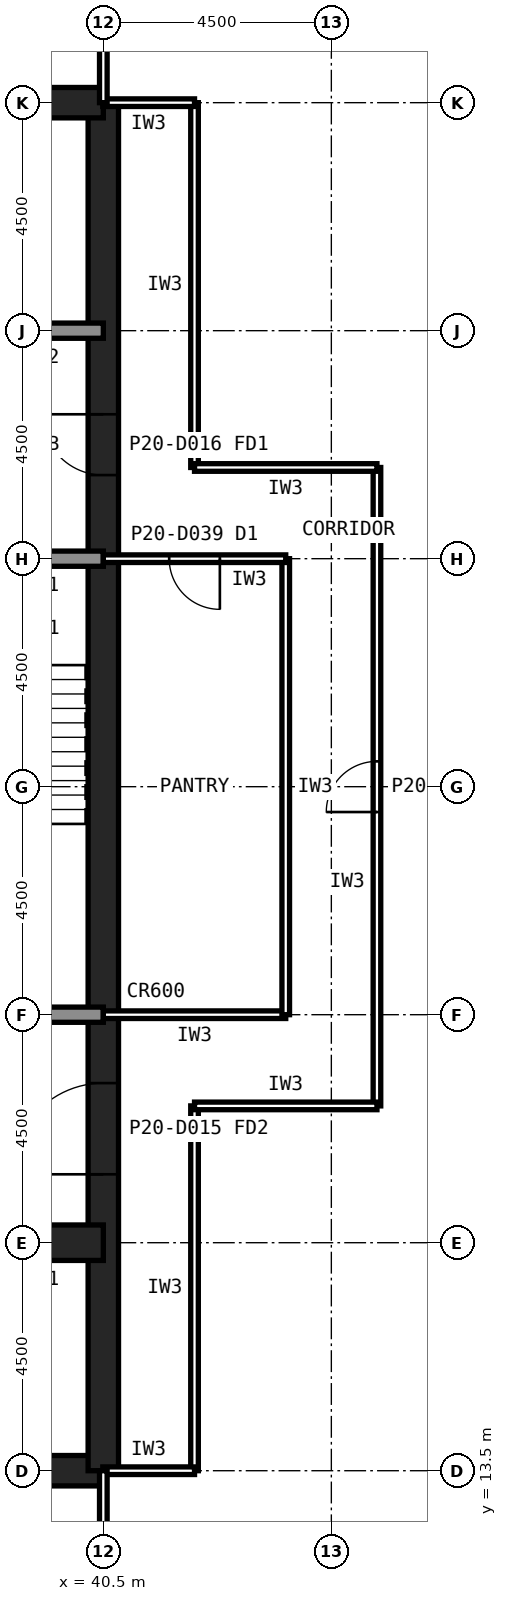
"""IFC4 building model, lengths in metres.
Left out: names, types, materials, properties, quantities, classifications, styles, units other than length and angle.
Written with IfcOpenShell. Run it as: python <this file> out.ifc"""

import sys

from ifc_helpers import new_model, si_unit, direction, frame, frame_2d, origin, place, context, subcontext, project, spatial, rectangle, extrude, element, fill, save


model = new_model("IFC4")
c1 = context("Model", 3, precision=1e-05, world=origin(), true_north=direction((0.0, 1.0)))
c2 = subcontext(c1, "Body", "Model", "MODEL_VIEW")
j1 = project(units=[si_unit("LENGTHUNIT", "METRE"), si_unit("PLANEANGLEUNIT", "RADIAN")], contexts=[c1])
p1 = place(None, origin())
s1 = spatial("IfcSite", under=j1, at=p1, CompositionType="ELEMENT")
p2 = place(p1, origin())
s2 = spatial("IfcBuilding", under=s1, at=p2, CompositionType="ELEMENT")
p3 = place(p2, frame((0.0, 0.0, 87.8)))
s3 = spatial("IfcBuildingStorey", under=s2, at=p3, CompositionType="ELEMENT", Elevation=87.8)
p4 = place(p3, frame((13.5, 13.5, 0.0), z_axis=(0.0, 0.0, 1.0), x_axis=(1.0, 0.0, 0.0)))
e1 = element("IfcWall", 1, at=p4, inside=s3, PredefinedType="SHEAR", context=c2, shape_type="SweptSolid", body=[
    extrude(rectangle(XDim=27.0, YDim=0.6, at=frame_2d((13.5, 0.0))), origin(), (0.0, 0.0, 1.0), 4.2),
])
p5 = place(p3, frame((40.5, 13.5, 0.0), z_axis=(0.0, 0.0, 1.0), x_axis=(0.0, 1.0, 0.0)))
e2 = element("IfcWall", 2, at=p5, inside=s3, PredefinedType="SHEAR", context=c2, shape_type="SweptSolid", body=[
    extrude(rectangle(XDim=27.0, YDim=0.6, at=frame_2d((13.5, 0.0))), origin(), (0.0, 0.0, 1.0), 4.2),
])
p6 = place(p5, frame((5.85, 0.0, 0.0)))
e3 = element("IfcOpeningElement", 3, at=p6, cuts=e2, PredefinedType="OPENING", context=c2, shape_type="SweptSolid", body=[
    extrude(rectangle(XDim=1.8, YDim=2.1, at=frame_2d((0.9, 1.05))), frame((0.0, 0.31, 0.0), z_axis=(0.0, -1.0, 0.0), x_axis=(1.0, 0.0, 0.0)), (0.0, 0.0, 1.0), 0.62),
])
p7 = place(p5, frame((19.65, 0.0, 0.0)))
e4 = element("IfcOpeningElement", 4, at=p7, cuts=e2, PredefinedType="OPENING", context=c2, shape_type="SweptSolid", body=[
    extrude(rectangle(XDim=1.2, YDim=2.1, at=frame_2d((0.6, 1.05))), frame((0.0, 0.31, 0.0), z_axis=(0.0, -1.0, 0.0), x_axis=(1.0, 0.0, 0.0)), (0.0, 0.0, 1.0), 0.62),
])
p8 = place(p3, frame((40.5, 40.5, 0.0), z_axis=(0.0, 0.0, 1.0), x_axis=(-1.0, 0.0, 0.0)))
e5 = element("IfcWall", 5, at=p8, inside=s3, PredefinedType="SHEAR", context=c2, shape_type="SweptSolid", body=[
    extrude(rectangle(XDim=27.0, YDim=0.6, at=frame_2d((13.5, 0.0))), origin(), (0.0, 0.0, 1.0), 4.2),
])
p9 = place(p3, frame((13.5, 18.0, 0.0), z_axis=(0.0, 0.0, 1.0), x_axis=(1.0, 0.0, 0.0)))
e6 = element("IfcWall", 6, at=p9, inside=s3, PredefinedType="SHEAR", context=c2, shape_type="SweptSolid", body=[
    extrude(rectangle(XDim=27.0, YDim=0.7, at=frame_2d((13.5, 0.0))), origin(), (0.0, 0.0, 1.0), 4.2),
])
p10 = place(p9, frame((24.3, 0.0, 0.0)))
e7 = element("IfcOpeningElement", 7, at=p10, cuts=e6, PredefinedType="OPENING", context=c2, shape_type="SweptSolid", body=[
    extrude(rectangle(XDim=0.9, YDim=2.1, at=frame_2d((0.45, 1.05))), frame((0.0, 0.36, 0.0), z_axis=(0.0, -1.0, 0.0), x_axis=(1.0, 0.0, 0.0)), (0.0, 0.0, 1.0), 0.72),
])
p11 = place(p9, frame((5.45, 0.0, 0.0)))
e8 = element("IfcOpeningElement", 8, at=p11, cuts=e6, PredefinedType="OPENING", context=c2, shape_type="SweptSolid", body=[
    extrude(rectangle(XDim=1.1, YDim=2.1, at=frame_2d((0.55, 1.05))), frame((0.0, 0.36, 0.0), z_axis=(0.0, -1.0, 0.0), x_axis=(1.0, 0.0, 0.0)), (0.0, 0.0, 1.0), 0.72),
])
p12 = place(p9, frame((8.45, 0.0, 0.0)))
e9 = element("IfcOpeningElement", 9, at=p12, cuts=e6, PredefinedType="OPENING", context=c2, shape_type="SweptSolid", body=[
    extrude(rectangle(XDim=1.1, YDim=2.1, at=frame_2d((0.55, 1.05))), frame((0.0, 0.36, 0.0), z_axis=(0.0, -1.0, 0.0), x_axis=(1.0, 0.0, 0.0)), (0.0, 0.0, 1.0), 0.72),
])
p13 = place(p9, frame((11.45, 0.0, 0.0)))
e10 = element("IfcOpeningElement", 10, at=p13, cuts=e6, PredefinedType="OPENING", context=c2, shape_type="SweptSolid", body=[
    extrude(rectangle(XDim=1.1, YDim=2.1, at=frame_2d((0.55, 1.05))), frame((0.0, 0.36, 0.0), z_axis=(0.0, -1.0, 0.0), x_axis=(1.0, 0.0, 0.0)), (0.0, 0.0, 1.0), 0.72),
])
p14 = place(p9, frame((14.45, 0.0, 0.0)))
e11 = element("IfcOpeningElement", 11, at=p14, cuts=e6, PredefinedType="OPENING", context=c2, shape_type="SweptSolid", body=[
    extrude(rectangle(XDim=1.1, YDim=2.1, at=frame_2d((0.55, 1.05))), frame((0.0, 0.36, 0.0), z_axis=(0.0, -1.0, 0.0), x_axis=(1.0, 0.0, 0.0)), (0.0, 0.0, 1.0), 0.72),
])
p15 = place(p9, frame((17.45, 0.0, 0.0)))
e12 = element("IfcOpeningElement", 12, at=p15, cuts=e6, PredefinedType="OPENING", context=c2, shape_type="SweptSolid", body=[
    extrude(rectangle(XDim=1.1, YDim=2.1, at=frame_2d((0.55, 1.05))), frame((0.0, 0.36, 0.0), z_axis=(0.0, -1.0, 0.0), x_axis=(1.0, 0.0, 0.0)), (0.0, 0.0, 1.0), 0.72),
])
p16 = place(p9, frame((20.45, 0.0, 0.0)))
e13 = element("IfcOpeningElement", 13, at=p16, cuts=e6, PredefinedType="OPENING", context=c2, shape_type="SweptSolid", body=[
    extrude(rectangle(XDim=1.1, YDim=2.1, at=frame_2d((0.55, 1.05))), frame((0.0, 0.36, 0.0), z_axis=(0.0, -1.0, 0.0), x_axis=(1.0, 0.0, 0.0)), (0.0, 0.0, 1.0), 0.72),
])
p17 = place(p9, frame((1.6, 0.0, 0.0)))
e14 = element("IfcOpeningElement", 14, at=p17, cuts=e6, PredefinedType="OPENING", context=c2, shape_type="SweptSolid", body=[
    extrude(rectangle(XDim=1.3, YDim=2.2, at=frame_2d((0.65, 1.1))), frame((0.0, 0.36, 0.0), z_axis=(0.0, -1.0, 0.0), x_axis=(1.0, 0.0, 0.0)), (0.0, 0.0, 1.0), 0.72),
])
p18 = place(p3, frame((13.5, 36.0, 0.0), z_axis=(0.0, 0.0, 1.0), x_axis=(1.0, 0.0, 0.0)))
e15 = element("IfcWall", 15, at=p18, inside=s3, PredefinedType="SOLIDWALL", context=c2, shape_type="SweptSolid", body=[
    extrude(rectangle(XDim=27.0, YDim=0.3, at=frame_2d((13.5, 0.0))), origin(), (0.0, 0.0, 1.0), 4.04),
])
p19 = place(p18, frame((1.8, 0.0, 0.0)))
e16 = element("IfcOpeningElement", 16, at=p19, cuts=e15, PredefinedType="OPENING", context=c2, shape_type="SweptSolid", body=[
    extrude(rectangle(XDim=0.9, YDim=2.1, at=frame_2d((0.45, 1.05))), frame((0.0, 0.16, 0.0), z_axis=(0.0, -1.0, 0.0), x_axis=(1.0, 0.0, 0.0)), (0.0, 0.0, 1.0), 0.32),
])
p20 = place(p18, frame((24.1, 0.0, 0.0)))
e17 = element("IfcOpeningElement", 17, at=p20, cuts=e15, PredefinedType="OPENING", context=c2, shape_type="SweptSolid", body=[
    extrude(rectangle(XDim=1.3, YDim=2.2, at=frame_2d((0.65, 1.1))), frame((0.0, 0.16, 0.0), z_axis=(0.0, -1.0, 0.0), x_axis=(1.0, 0.0, 0.0)), (0.0, 0.0, 1.0), 0.32),
])
p21 = place(p3, frame((13.5, 22.5, 0.0), z_axis=(0.0, 0.0, 1.0), x_axis=(1.0, 0.0, 0.0)))
e18 = element("IfcWall", 18, at=p21, inside=s3, PredefinedType="SOLIDWALL", context=c2, shape_type="SweptSolid", body=[
    extrude(rectangle(XDim=27.0, YDim=0.3, at=frame_2d((13.5, 0.0))), origin(), (0.0, 0.0, 1.0), 4.04),
])
p22 = place(p21, frame((1.65, 0.0, 0.0)))
e19 = element("IfcOpeningElement", 19, at=p22, cuts=e18, PredefinedType="OPENING", context=c2, shape_type="SweptSolid", body=[
    extrude(rectangle(XDim=1.2, YDim=2.1, at=frame_2d((0.6, 1.05))), frame((0.0, 0.16, 0.0), z_axis=(0.0, -1.0, 0.0), x_axis=(1.0, 0.0, 0.0)), (0.0, 0.0, 1.0), 0.32),
])
p23 = place(p21, frame((6.025, 0.0, 0.0)))
e20 = element("IfcOpeningElement", 20, at=p23, cuts=e18, PredefinedType="OPENING", context=c2, shape_type="SweptSolid", body=[
    extrude(rectangle(XDim=1.0, YDim=2.1, at=frame_2d((0.5, 1.05))), frame((0.0, 0.16, 0.0), z_axis=(0.0, -1.0, 0.0), x_axis=(1.0, 0.0, 0.0)), (0.0, 0.0, 1.0), 0.32),
])
p24 = place(p21, frame((10.525, 0.0, 0.0)))
e21 = element("IfcOpeningElement", 21, at=p24, cuts=e18, PredefinedType="OPENING", context=c2, shape_type="SweptSolid", body=[
    extrude(rectangle(XDim=1.0, YDim=2.1, at=frame_2d((0.5, 1.05))), frame((0.0, 0.16, 0.0), z_axis=(0.0, -1.0, 0.0), x_axis=(1.0, 0.0, 0.0)), (0.0, 0.0, 1.0), 0.32),
])
p25 = place(p21, frame((19.75, 0.0, 0.0)))
e22 = element("IfcOpeningElement", 22, at=p25, cuts=e18, PredefinedType="OPENING", context=c2, shape_type="SweptSolid", body=[
    extrude(rectangle(XDim=1.0, YDim=2.1, at=frame_2d((0.5, 1.05))), frame((0.0, 0.16, 0.0), z_axis=(0.0, -1.0, 0.0), x_axis=(1.0, 0.0, 0.0)), (0.0, 0.0, 1.0), 0.32),
])
p26 = place(p21, frame((15.05, 0.0, 0.0)))
e23 = element("IfcOpeningElement", 23, at=p26, cuts=e18, PredefinedType="OPENING", context=c2, shape_type="SweptSolid", body=[
    extrude(rectangle(XDim=1.4, YDim=2.4, at=frame_2d((0.7, 1.2))), frame((0.0, 0.16, 0.0), z_axis=(0.0, -1.0, 0.0), x_axis=(1.0, 0.0, 0.0)), (0.0, 0.0, 1.0), 0.32),
])
p27 = place(p3, frame((13.5, 31.5, 0.0), z_axis=(0.0, 0.0, 1.0), x_axis=(1.0, 0.0, 0.0)))
e24 = element("IfcWall", 24, at=p27, inside=s3, PredefinedType="SOLIDWALL", context=c2, shape_type="SweptSolid", body=[
    extrude(rectangle(XDim=27.0, YDim=0.3, at=frame_2d((13.5, 0.0))), origin(), (0.0, 0.0, 1.0), 4.04),
])
p28 = place(p27, frame((24.15, 0.0, 0.0)))
e25 = element("IfcOpeningElement", 25, at=p28, cuts=e24, PredefinedType="OPENING", context=c2, shape_type="SweptSolid", body=[
    extrude(rectangle(XDim=1.2, YDim=2.1, at=frame_2d((0.6, 1.05))), frame((0.0, 0.16, 0.0), z_axis=(0.0, -1.0, 0.0), x_axis=(1.0, 0.0, 0.0)), (0.0, 0.0, 1.0), 0.32),
])
p29 = place(p27, frame((15.3, 0.0, 0.0)))
e26 = element("IfcOpeningElement", 26, at=p29, cuts=e24, PredefinedType="OPENING", context=c2, shape_type="SweptSolid", body=[
    extrude(rectangle(XDim=0.9, YDim=2.1, at=frame_2d((0.45, 1.05))), frame((0.0, 0.16, 0.0), z_axis=(0.0, -1.0, 0.0), x_axis=(1.0, 0.0, 0.0)), (0.0, 0.0, 1.0), 0.32),
])
p30 = place(p27, frame((19.8, 0.0, 0.0)))
e27 = element("IfcOpeningElement", 27, at=p30, cuts=e24, PredefinedType="OPENING", context=c2, shape_type="SweptSolid", body=[
    extrude(rectangle(XDim=0.9, YDim=2.1, at=frame_2d((0.45, 1.05))), frame((0.0, 0.16, 0.0), z_axis=(0.0, -1.0, 0.0), x_axis=(1.0, 0.0, 0.0)), (0.0, 0.0, 1.0), 0.32),
])
p31 = place(p3, frame((45.9, 20.7, 0.0), z_axis=(0.0, 0.0, 1.0), x_axis=(0.0, 1.0, 0.0)))
e28 = element("IfcWall", 28, at=p31, inside=s3, PredefinedType="PARTITIONING", context=c2, shape_type="SweptSolid", body=[
    extrude(rectangle(XDim=12.6, YDim=0.15, at=frame_2d((6.3, 0.0))), origin(), (0.0, 0.0, 1.0), 4.04),
])
p32 = place(p31, frame((5.8, 0.0, 0.0)))
e29 = element("IfcOpeningElement", 29, at=p32, cuts=e28, PredefinedType="OPENING", context=c2, shape_type="SweptSolid", body=[
    extrude(rectangle(XDim=1.0, YDim=2.1, at=frame_2d((0.5, 1.05))), frame((0.0, 0.085, 0.0), z_axis=(0.0, -1.0, 0.0), x_axis=(1.0, 0.0, 0.0)), (0.0, 0.0, 1.0), 0.17),
])
for number, where, z_axis, x_axis in (
    (30, (42.3, 13.5, 0.0), (0.0, 0.0, 1.0), (0.0, 1.0, 0.0)),
    (31, (42.3, 33.3, 0.0), (0.0, 0.0, 1.0), (0.0, 1.0, 0.0)),
):
    element("IfcWall", number, at=place(p3, frame(where, z_axis=z_axis, x_axis=x_axis)), inside=s3, PredefinedType="PARTITIONING", context=c2, shape_type="SweptSolid", body=[
        extrude(rectangle(XDim=7.2, YDim=0.15, at=frame_2d((3.6, 0.0))), origin(), (0.0, 0.0, 1.0), 4.04),
    ])
for number, where, z_axis, x_axis in (
    (32, (42.3, 20.7, 0.0), (0.0, 0.0, 1.0), (1.0, 0.0, 0.0)),
    (33, (45.9, 33.3, 0.0), (0.0, 0.0, 1.0), (-1.0, 0.0, 0.0)),
):
    element("IfcWall", number, at=place(p3, frame(where, z_axis=z_axis, x_axis=x_axis)), inside=s3, PredefinedType="PARTITIONING", context=c2, shape_type="SweptSolid", body=[
        extrude(rectangle(XDim=3.6, YDim=0.15, at=frame_2d((1.8, 0.0))), origin(), (0.0, 0.0, 1.0), 4.04),
    ])
for number, where, z_axis, x_axis in (
    (34, (40.49, 13.5, 0.0), (0.0, 0.0, 1.0), (1.0, 0.0, 0.0)),
    (35, (42.3, 40.5, 0.0), (0.0, 0.0, 1.0), (-1.0, 0.0, 0.0)),
):
    element("IfcWall", number, at=place(p3, frame(where, z_axis=z_axis, x_axis=x_axis)), inside=s3, PredefinedType="PARTITIONING", context=c2, shape_type="SweptSolid", body=[
        extrude(rectangle(XDim=1.81, YDim=0.15, at=frame_2d((0.905, 0.0))), origin(), (0.0, 0.0, 1.0), 3.189),
    ])
p33 = place(p3, frame((40.5, 22.5, 0.0), z_axis=(0.0, 0.0, 1.0), x_axis=(1.0, 0.0, 0.0)))
e36 = element("IfcWall", 36, at=p33, inside=s3, PredefinedType="PARTITIONING", context=c2, shape_type="SweptSolid", body=[
    extrude(rectangle(XDim=3.6, YDim=0.15, at=frame_2d((1.8, 0.0))), origin(), (0.0, 0.0, 1.0), 3.189),
])
p34 = place(p3, frame((44.1, 22.5, 0.0), z_axis=(0.0, 0.0, 1.0), x_axis=(0.0, 1.0, 0.0)))
e37 = element("IfcWall", 37, at=p34, inside=s3, PredefinedType="PARTITIONING", context=c2, shape_type="SweptSolid", body=[
    extrude(rectangle(XDim=9.0, YDim=0.15, at=frame_2d((4.5, 0.0))), origin(), (0.0, 0.0, 1.0), 4.04),
])
p35 = place(p3, frame((44.1, 31.5, 0.0), z_axis=(0.0, 0.0, 1.0), x_axis=(-1.0, 0.0, 0.0)))
e38 = element("IfcWall", 38, at=p35, inside=s3, PredefinedType="PARTITIONING", context=c2, shape_type="SweptSolid", body=[
    extrude(rectangle(XDim=3.6, YDim=0.15, at=frame_2d((1.8, 0.0))), origin(), (0.0, 0.0, 1.0), 3.189),
])
p36 = place(p35, frame((1.3, 0.0, 0.0)))
e39 = element("IfcOpeningElement", 39, at=p36, cuts=e38, PredefinedType="OPENING", context=c2, shape_type="SweptSolid", body=[
    extrude(rectangle(XDim=1.0, YDim=2.1, at=frame_2d((0.5, 1.05))), frame((0.0, 0.085, 0.0), z_axis=(0.0, -1.0, 0.0), x_axis=(1.0, 0.0, 0.0)), (0.0, 0.0, 1.0), 0.17),
])
p37 = place(p3, frame((40.5, 53.555, 0.0), z_axis=(0.0, 0.0, 1.0), x_axis=(0.0, -1.0, 0.0)))
e40 = element("IfcWall", 40, at=p37, inside=s3, PredefinedType="PARTITIONING", context=c2, shape_type="SweptSolid", body=[
    extrude(rectangle(XDim=13.055, YDim=0.15, at=frame_2d((6.527, 0.0))), origin(), (0.0, 0.0, 1.0), 3.189),
])
p38 = place(p37, frame((6.028, 0.0, 0.0)))
e41 = element("IfcOpeningElement", 41, at=p38, cuts=e40, PredefinedType="OPENING", context=c2, shape_type="SweptSolid", body=[
    extrude(rectangle(XDim=1.0, YDim=2.1, at=frame_2d((0.5, 1.05))), frame((0.0, 0.085, 0.0), z_axis=(0.0, -1.0, 0.0), x_axis=(1.0, 0.0, 0.0)), (0.0, 0.0, 1.0), 0.17),
])
p39 = place(p3, frame((40.5, 0.445, 0.0), z_axis=(0.0, 0.0, 1.0), x_axis=(0.0, 1.0, 0.0)))
e42 = element("IfcWall", 42, at=p39, inside=s3, PredefinedType="PARTITIONING", context=c2, shape_type="SweptSolid", body=[
    extrude(rectangle(XDim=13.055, YDim=0.15, at=frame_2d((6.527, 0.0))), origin(), (0.0, 0.0, 1.0), 3.189),
])
p40 = place(p39, frame((6.028, 0.0, 0.0)))
e43 = element("IfcOpeningElement", 43, at=p40, cuts=e42, PredefinedType="OPENING", context=c2, shape_type="SweptSolid", body=[
    extrude(rectangle(XDim=1.0, YDim=2.1, at=frame_2d((0.5, 1.05))), frame((0.0, 0.085, 0.0), z_axis=(0.0, -1.0, 0.0), x_axis=(1.0, 0.0, 0.0)), (0.0, 0.0, 1.0), 0.17),
])
p41 = place(p6, origin())
e44 = element("IfcDoor", 44, at=p41, inside=s3, OperationType="SINGLE_SWING_LEFT", PredefinedType="DOOR", context=c2, shape_type="SweptSolid", body=[
    extrude(rectangle(XDim=1.8, YDim=2.1, at=frame_2d((0.9, 1.05))), frame((0.0, 0.025, 0.0), z_axis=(0.0, -1.0, 0.0), x_axis=(1.0, 0.0, 0.0)), (0.0, 0.0, 1.0), 0.05),
])
fill(e3, e44)
p42 = place(p7, origin())
e45 = element("IfcDoor", 45, at=p42, inside=s3, OperationType="SINGLE_SWING_RIGHT", PredefinedType="DOOR", context=c2, shape_type="SweptSolid", body=[
    extrude(rectangle(XDim=1.2, YDim=2.1, at=frame_2d((0.6, 1.05))), frame((0.0, 0.025, 0.0), z_axis=(0.0, -1.0, 0.0), x_axis=(1.0, 0.0, 0.0)), (0.0, 0.0, 1.0), 0.05),
])
fill(e4, e45)
p43 = place(p32, origin())
e46 = element("IfcDoor", 46, at=p43, inside=s3, OperationType="SINGLE_SWING_LEFT", PredefinedType="DOOR", context=c2, shape_type="SweptSolid", body=[
    extrude(rectangle(XDim=1.0, YDim=2.1, at=frame_2d((0.5, 1.05))), frame((0.0, 0.025, 0.0), z_axis=(0.0, -1.0, 0.0), x_axis=(1.0, 0.0, 0.0)), (0.0, 0.0, 1.0), 0.05),
])
fill(e29, e46)
p44 = place(p36, origin())
e47 = element("IfcDoor", 47, at=p44, inside=s3, OperationType="SINGLE_SWING_LEFT", PredefinedType="DOOR", context=c2, shape_type="SweptSolid", body=[
    extrude(rectangle(XDim=1.0, YDim=2.1, at=frame_2d((0.5, 1.05))), frame((0.0, 0.025, 0.0), z_axis=(0.0, -1.0, 0.0), x_axis=(1.0, 0.0, 0.0)), (0.0, 0.0, 1.0), 0.05),
])
fill(e39, e47)
save(model, sys.argv[1])
